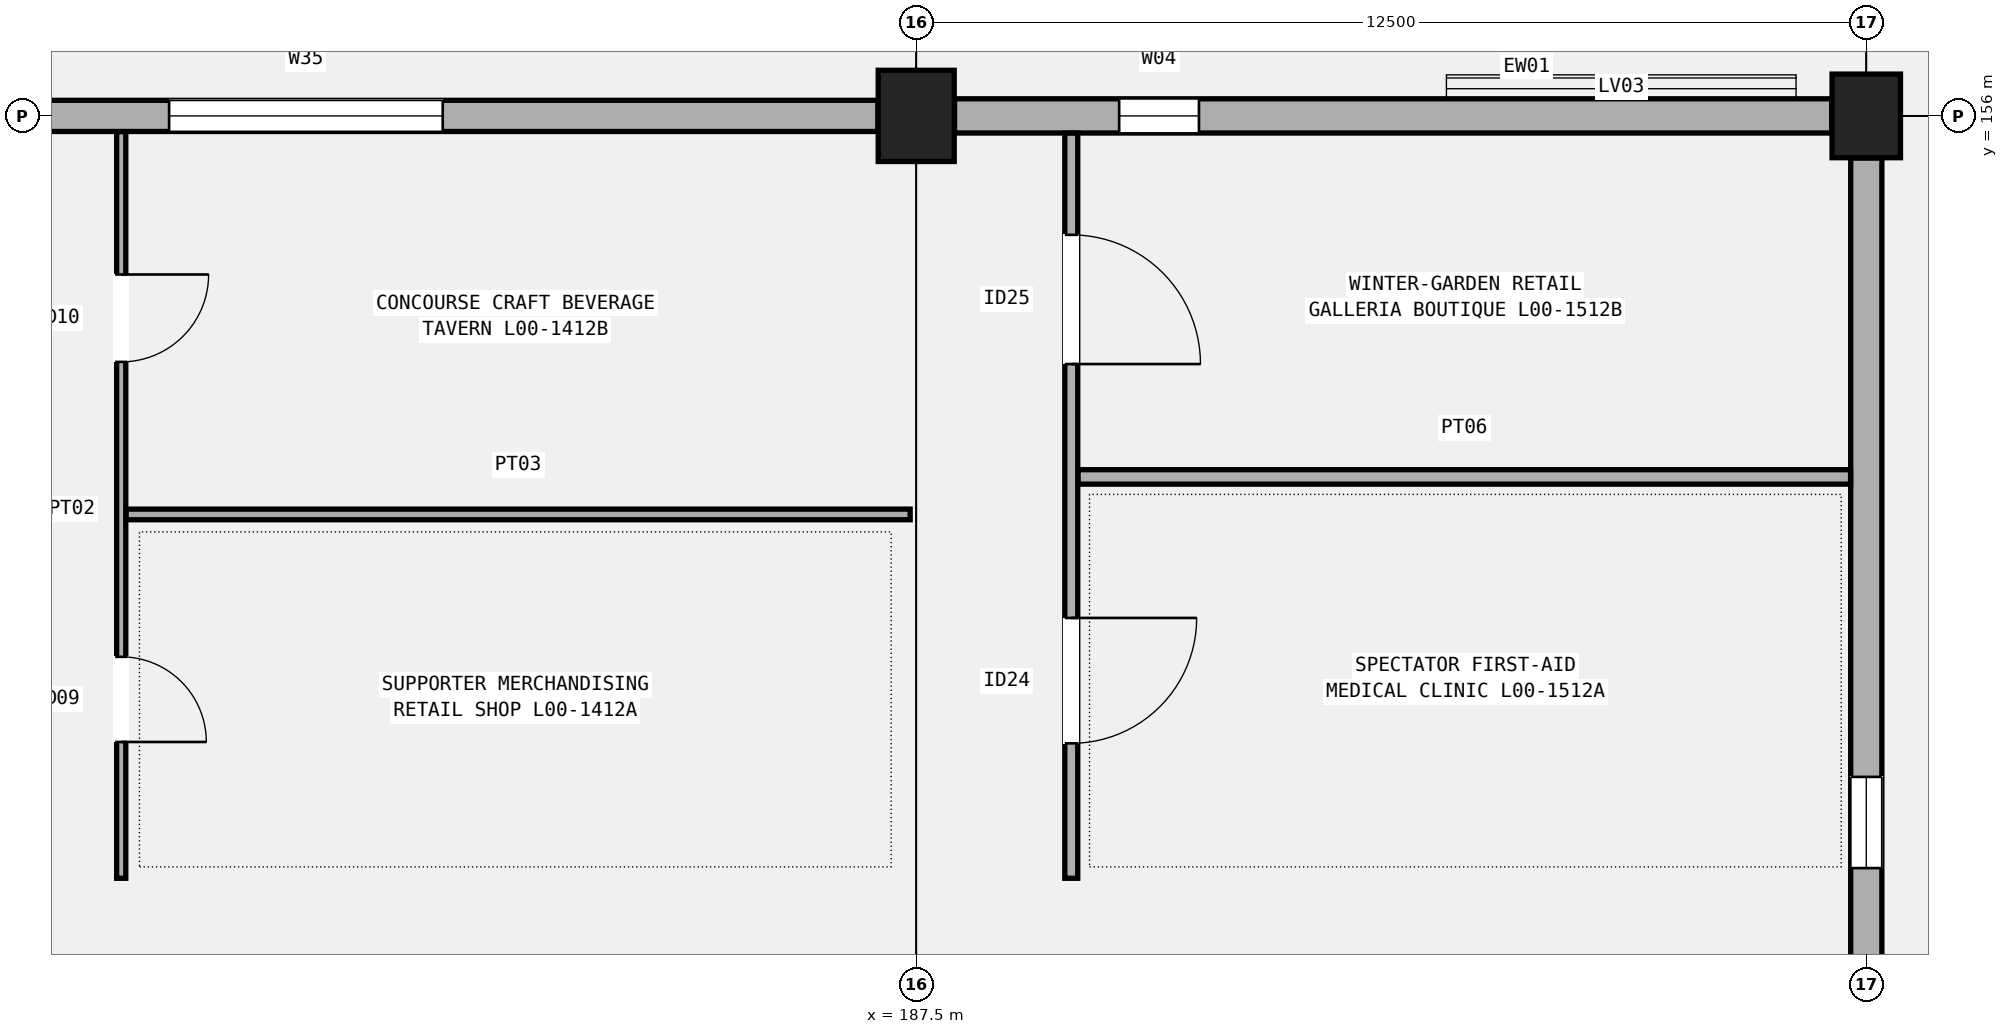
"""IFC4 building model, lengths in metres.
Left out: names, types, materials, properties, quantities, classifications, styles, units other than length and angle.
Written with IfcOpenShell. Run it as: python <this file> out.ifc"""

import sys

from ifc_helpers import new_model, si_unit, direction, frame, frame_2d, origin, origin_2d, place, context, subcontext, project, spatial, rectangle, extrude, element, fill, save


model = new_model("IFC4")
c1 = context("Model", 3, precision=1e-05, world=origin(), true_north=direction((0.0, 1.0)))
c2 = subcontext(c1, "Body", "Model", "MODEL_VIEW")
j1 = project(units=[si_unit("LENGTHUNIT", "METRE"), si_unit("PLANEANGLEUNIT", "RADIAN")], contexts=[c1])
p1 = place(None, origin())
s1 = spatial("IfcSite", under=j1, at=p1, CompositionType="ELEMENT")
p2 = place(p1, origin())
s2 = spatial("IfcBuilding", under=s1, at=p2, CompositionType="ELEMENT")
p3 = place(p2, origin())
s3 = spatial("IfcBuildingStorey", under=s2, at=p3, CompositionType="ELEMENT", Elevation=0.0)
p4 = place(p3, frame((187.5, 156.0, 0.0), z_axis=(0.0, 0.0, 1.0), x_axis=(1.0, 0.0, 0.0)))
e1 = element("IfcColumn", 1, at=p4, inside=s3, PredefinedType="COLUMN", context=c2, shape_type="SweptSolid", body=[
    extrude(rectangle(XDim=1.0, YDim=1.2, at=origin_2d()), origin(), (0.0, 0.0, 1.0), 5.4),
])
p5 = place(p3, frame((200.0, 156.0, 0.0), z_axis=(0.0, 0.0, 1.0), x_axis=(1.0, 0.0, 0.0)))
e2 = element("IfcColumn", 2, at=p5, inside=s3, PredefinedType="COLUMN", context=c2, shape_type="SweptSolid", body=[
    extrude(rectangle(XDim=0.9, YDim=1.1, at=origin_2d()), origin(), (0.0, 0.0, 1.0), 5.4),
])
p6 = place(p3, frame((175.429, 156.0, 0.0), z_axis=(0.0, 0.0, 1.0), x_axis=(1.0, 0.0, 0.0)))
e3 = element("IfcWall", 3, at=p6, inside=s3, PredefinedType="SOLIDWALL", context=c2, shape_type="SweptSolid", body=[
    extrude(rectangle(XDim=11.567, YDim=0.41, at=frame_2d((5.784, 0.0))), origin(), (0.0, 0.0, 1.0), 4.34),
])
p7 = place(p6, frame((2.241, 0.0, 0.95)))
e4 = element("IfcOpeningElement", 4, at=p7, cuts=e3, PredefinedType="OPENING", context=c2, shape_type="SweptSolid", body=[
    extrude(rectangle(XDim=3.6, YDim=1.75, at=frame_2d((1.8, 0.875))), frame((0.0, 0.215, 0.0), z_axis=(0.0, -1.0, 0.0), x_axis=(1.0, 0.0, 0.0)), (0.0, 0.0, 1.0), 0.43),
])
p8 = place(p3, frame((188.004, 156.0, 0.0), z_axis=(0.0, 0.0, 1.0), x_axis=(1.0, 0.0, 0.0)))
e5 = element("IfcWall", 5, at=p8, inside=s3, PredefinedType="SOLIDWALL", context=c2, shape_type="SweptSolid", body=[
    extrude(rectangle(XDim=11.542, YDim=0.45, at=frame_2d((5.771, 0.0))), origin(), (0.0, 0.0, 1.0), 4.09),
])
p9 = place(p8, frame((2.166, 0.0, 0.95)))
e6 = element("IfcOpeningElement", 6, at=p9, cuts=e5, PredefinedType="OPENING", context=c2, shape_type="SweptSolid", body=[
    extrude(rectangle(XDim=1.05, YDim=2.2, at=frame_2d((0.525, 1.1))), frame((0.0, 0.235, 0.0), z_axis=(0.0, -1.0, 0.0), x_axis=(1.0, 0.0, 0.0)), (0.0, 0.0, 1.0), 0.47),
])
p10 = place(p3, frame((200.0, 144.604, 0.0), z_axis=(0.0, 0.0, 1.0), x_axis=(0.0, 1.0, 0.0)))
e7 = element("IfcWall", 7, at=p10, inside=s3, PredefinedType="SOLIDWALL", context=c2, shape_type="SweptSolid", body=[
    extrude(rectangle(XDim=10.842, YDim=0.41, at=frame_2d((5.421, 0.0))), origin(), (0.0, 0.0, 1.0), 4.34),
])
p11 = place(p10, frame((1.5, 0.0, 0.95)))
e8 = element("IfcOpeningElement", 8, at=p11, cuts=e7, PredefinedType="OPENING", context=c2, shape_type="SweptSolid", body=[
    extrude(rectangle(XDim=1.2, YDim=1.9, at=frame_2d((0.6, 0.95))), frame((0.0, 0.215, 0.0), z_axis=(0.0, -1.0, 0.0), x_axis=(1.0, 0.0, 0.0)), (0.0, 0.0, 1.0), 0.43),
])
p12 = place(p3, frame((177.04, 145.97, 0.0), z_axis=(0.0, 0.0, 1.0), x_axis=(0.0, 1.0, 0.0)))
e9 = element("IfcWall", 9, at=p12, inside=s3, PredefinedType="PARTITIONING", context=c2, shape_type="SweptSolid", body=[
    extrude(rectangle(XDim=9.823, YDim=0.12, at=frame_2d((4.912, 0.0))), origin(), (0.0, 0.0, 1.0), 4.52),
])
p13 = place(p12, frame((2.914, 0.0, 0.0), z_axis=(0.0, 0.0, 1.0), x_axis=(-1.0, 0.0, 0.0)))
e10 = element("IfcOpeningElement", 10, at=p13, cuts=e9, PredefinedType="OPENING", context=c2, shape_type="SweptSolid", body=[
    extrude(rectangle(XDim=1.12, YDim=2.18, at=frame_2d((0.56, 1.09))), frame((0.0, 0.07, 0.0), z_axis=(0.0, -1.0, 0.0), x_axis=(1.0, 0.0, 0.0)), (0.0, 0.0, 1.0), 0.14),
])
p14 = place(p12, frame((7.943, 0.0, 0.0), z_axis=(0.0, 0.0, 1.0), x_axis=(-1.0, 0.0, 0.0)))
e11 = element("IfcOpeningElement", 11, at=p14, cuts=e9, PredefinedType="OPENING", context=c2, shape_type="SweptSolid", body=[
    extrude(rectangle(XDim=1.15, YDim=2.15, at=frame_2d((0.575, 1.075))), frame((0.0, 0.07, 0.0), z_axis=(0.0, -1.0, 0.0), x_axis=(1.0, 0.0, 0.0)), (0.0, 0.0, 1.0), 0.14),
])
p15 = place(p3, frame((177.105, 150.757, 0.0), z_axis=(0.0, 0.0, 1.0), x_axis=(1.0, 0.0, 0.0)))
e12 = element("IfcWall", 12, at=p15, inside=s3, PredefinedType="PARTITIONING", context=c2, shape_type="SweptSolid", body=[
    extrude(rectangle(XDim=10.315, YDim=0.14, at=frame_2d((5.157, 0.0))), origin(), (0.0, 0.0, 1.0), 4.52),
])
p16 = place(p3, frame((189.54, 145.97, 0.0), z_axis=(0.0, 0.0, 1.0), x_axis=(0.0, 1.0, 0.0)))
e13 = element("IfcWall", 13, at=p16, inside=s3, PredefinedType="PARTITIONING", context=c2, shape_type="SweptSolid", body=[
    extrude(rectangle(XDim=9.803, YDim=0.17, at=frame_2d((4.901, 0.0))), origin(), (0.0, 0.0, 1.0), 4.52),
])
p17 = place(p16, frame((3.425, 0.0, 0.0), z_axis=(0.0, 0.0, 1.0), x_axis=(-1.0, 0.0, 0.0)))
e14 = element("IfcOpeningElement", 14, at=p17, cuts=e13, PredefinedType="OPENING", context=c2, shape_type="SweptSolid", body=[
    extrude(rectangle(XDim=1.65, YDim=2.28, at=frame_2d((0.825, 1.14))), frame((0.0, 0.095, 0.0), z_axis=(0.0, -1.0, 0.0), x_axis=(1.0, 0.0, 0.0)), (0.0, 0.0, 1.0), 0.19),
])
p18 = place(p16, frame((8.465, 0.0, 0.0), z_axis=(0.0, 0.0, 1.0), x_axis=(-1.0, 0.0, 0.0)))
e15 = element("IfcOpeningElement", 15, at=p18, cuts=e13, PredefinedType="OPENING", context=c2, shape_type="SweptSolid", body=[
    extrude(rectangle(XDim=1.7, YDim=2.32, at=frame_2d((0.85, 1.16))), frame((0.0, 0.095, 0.0), z_axis=(0.0, -1.0, 0.0), x_axis=(1.0, 0.0, 0.0)), (0.0, 0.0, 1.0), 0.19),
])
p19 = place(p3, frame((189.63, 151.25, 0.0), z_axis=(0.0, 0.0, 1.0), x_axis=(1.0, 0.0, 0.0)))
e16 = element("IfcWall", 16, at=p19, inside=s3, PredefinedType="PARTITIONING", context=c2, shape_type="SweptSolid", body=[
    extrude(rectangle(XDim=10.163, YDim=0.19, at=frame_2d((5.082, 0.0))), origin(), (0.0, 0.0, 1.0), 4.52),
])
p20 = place(p7, origin())
e17 = element("IfcWindow", 17, at=p20, inside=s3, PartitioningType="SINGLE_PANEL", PredefinedType="WINDOW", context=c2, shape_type="SweptSolid", body=[
    extrude(rectangle(XDim=3.6, YDim=1.75, at=frame_2d((1.8, 0.875))), frame((0.0, 0.03, 0.0), z_axis=(0.0, -1.0, 0.0), x_axis=(1.0, 0.0, 0.0)), (0.0, 0.0, 1.0), 0.06),
])
fill(e4, e17)
p21 = place(p9, origin())
e18 = element("IfcWindow", 18, at=p21, inside=s3, PartitioningType="SINGLE_PANEL", PredefinedType="WINDOW", context=c2, shape_type="SweptSolid", body=[
    extrude(rectangle(XDim=1.05, YDim=2.2, at=frame_2d((0.525, 1.1))), frame((0.0, 0.03, 0.0), z_axis=(0.0, -1.0, 0.0), x_axis=(1.0, 0.0, 0.0)), (0.0, 0.0, 1.0), 0.06),
])
fill(e6, e18)
p22 = place(p11, origin())
e19 = element("IfcWindow", 19, at=p22, inside=s3, PartitioningType="SINGLE_PANEL", PredefinedType="WINDOW", context=c2, shape_type="SweptSolid", body=[
    extrude(rectangle(XDim=1.2, YDim=1.9, at=frame_2d((0.6, 0.95))), frame((0.0, 0.03, 0.0), z_axis=(0.0, -1.0, 0.0), x_axis=(1.0, 0.0, 0.0)), (0.0, 0.0, 1.0), 0.06),
])
fill(e8, e19)
p23 = place(p13, origin())
e20 = element("IfcDoor", 20, at=p23, inside=s3, OperationType="SINGLE_SWING_RIGHT", PredefinedType="DOOR", context=c2, shape_type="SweptSolid", body=[
    extrude(rectangle(XDim=1.12, YDim=2.18, at=frame_2d((0.56, 1.09))), frame((0.0, 0.025, 0.0), z_axis=(0.0, -1.0, 0.0), x_axis=(1.0, 0.0, 0.0)), (0.0, 0.0, 1.0), 0.05),
])
fill(e10, e20)
p24 = place(p14, origin())
e21 = element("IfcDoor", 21, at=p24, inside=s3, OperationType="SINGLE_SWING_LEFT", PredefinedType="DOOR", context=c2, shape_type="SweptSolid", body=[
    extrude(rectangle(XDim=1.15, YDim=2.15, at=frame_2d((0.575, 1.075))), frame((0.0, 0.025, 0.0), z_axis=(0.0, -1.0, 0.0), x_axis=(1.0, 0.0, 0.0)), (0.0, 0.0, 1.0), 0.05),
])
fill(e11, e21)
p25 = place(p17, origin())
e22 = element("IfcDoor", 22, at=p25, inside=s3, OperationType="SINGLE_SWING_LEFT", PredefinedType="DOOR", context=c2, shape_type="SweptSolid", body=[
    extrude(rectangle(XDim=1.65, YDim=2.28, at=frame_2d((0.825, 1.14))), frame((0.0, 0.025, 0.0), z_axis=(0.0, -1.0, 0.0), x_axis=(1.0, 0.0, 0.0)), (0.0, 0.0, 1.0), 0.05),
])
fill(e14, e22)
p26 = place(p18, origin())
e23 = element("IfcDoor", 23, at=p26, inside=s3, OperationType="SINGLE_SWING_RIGHT", PredefinedType="DOOR", context=c2, shape_type="SweptSolid", body=[
    extrude(rectangle(XDim=1.7, YDim=2.32, at=frame_2d((0.85, 1.16))), frame((0.0, 0.025, 0.0), z_axis=(0.0, -1.0, 0.0), x_axis=(1.0, 0.0, 0.0)), (0.0, 0.0, 1.0), 0.05),
])
fill(e15, e23)
save(model, sys.argv[1])
